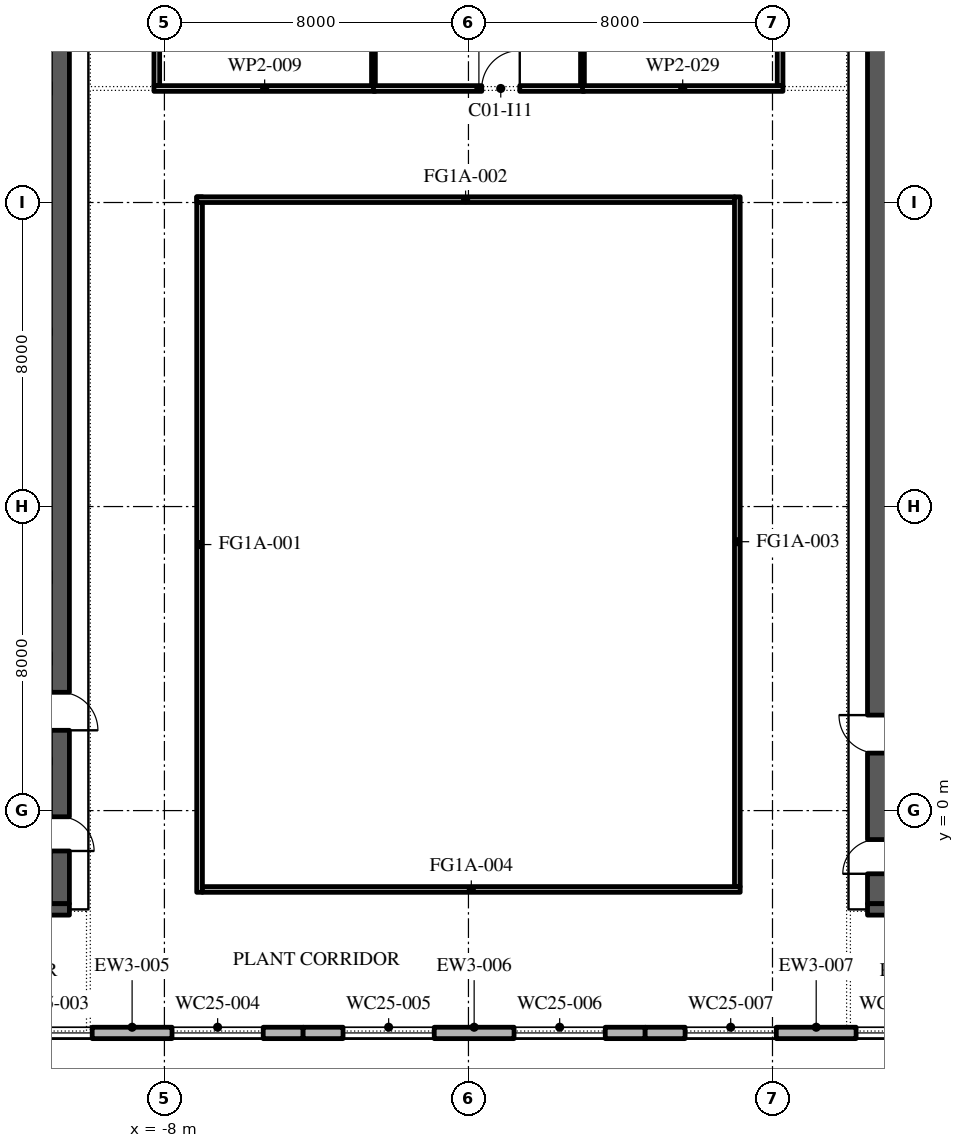
"""IFC4 building model, lengths in metres.
Left out: names, types, materials, properties, quantities, classifications, styles, units other than length and angle.
Written with IfcOpenShell. Run it as: python <this file> out.ifc"""

import sys

from ifc_helpers import new_model, si_unit, direction, frame, frame_2d, origin, place, context, subcontext, project, spatial, polyline, rectangle, outline, extrude, element, fill, save


model = new_model("IFC4")
c1 = context("Model", 3, precision=1e-05, world=origin(), true_north=direction((0.0, 1.0)))
c2 = subcontext(c1, "Body", "Model", "MODEL_VIEW")
j1 = project(units=[si_unit("LENGTHUNIT", "METRE"), si_unit("PLANEANGLEUNIT", "RADIAN")], contexts=[c1])
p1 = place(None, origin())
s1 = spatial("IfcSite", under=j1, at=p1, CompositionType="ELEMENT")
p2 = place(p1, origin())
s2 = spatial("IfcBuilding", under=s1, at=p2, CompositionType="ELEMENT")
p3 = place(p2, frame((0.0, 0.0, 369.0)))
s3 = spatial("IfcBuildingStorey", under=s2, at=p3, CompositionType="ELEMENT", Elevation=369.0)
p4 = place(p3, frame((-7.075, -2.15, 0.0), z_axis=(0.0, 0.0, 1.0), x_axis=(0.0, 1.0, 0.0)))
e1 = element("IfcWall", 1, at=p4, inside=s3, PredefinedType="STANDARD", context=c2, shape_type="SweptSolid", body=[
    extrude(rectangle(XDim=18.3, YDim=0.15, at=frame_2d((9.15, 0.0))), origin(), (0.0, 0.0, 1.0), 4.0),
])
p5 = place(p3, frame((-7.15, 16.075, 0.0), z_axis=(0.0, 0.0, 1.0), x_axis=(1.0, 0.0, 0.0)))
e2 = element("IfcWall", 2, at=p5, inside=s3, PredefinedType="STANDARD", context=c2, shape_type="SweptSolid", body=[
    extrude(rectangle(XDim=14.15, YDim=0.15, at=frame_2d((7.075, 0.0))), origin(), (0.0, 0.0, 1.0), 4.0),
])
p6 = place(p3, frame((7.075, 16.15, 0.0), z_axis=(0.0, 0.0, 1.0), x_axis=(0.0, -1.0, 0.0)))
e3 = element("IfcWall", 3, at=p6, inside=s3, PredefinedType="STANDARD", context=c2, shape_type="SweptSolid", body=[
    extrude(rectangle(XDim=18.15, YDim=0.15, at=frame_2d((9.075, 0.0))), origin(), (0.0, 0.0, 1.0), 4.0),
])
p7 = place(p3, frame((7.15, -2.075, 0.0), z_axis=(0.0, 0.0, 1.0), x_axis=(-1.0, 0.0, 0.0)))
e4 = element("IfcWall", 4, at=p7, inside=s3, PredefinedType="STANDARD", context=c2, shape_type="SweptSolid", body=[
    extrude(rectangle(XDim=14.15, YDim=0.15, at=frame_2d((7.075, 0.0))), origin(), (0.0, 0.0, 1.0), 4.0),
])
p8 = place(p3, frame((-13.35, -5.85, 0.0), z_axis=(0.0, 0.0, 1.0), x_axis=(1.0, 0.0, 0.0)))
e5 = element("IfcWall", 5, at=p8, inside=s3, PredefinedType="STANDARD", context=c2, shape_type="SweptSolid", body=[
    extrude(rectangle(XDim=9.0, YDim=0.3, at=frame_2d((4.5, 0.0))), origin(), (0.0, 0.0, 1.0), 4.0),
])
p9 = place(p8, frame((1.05, 0.0, 0.8)))
e6 = element("IfcOpeningElement", 6, at=p9, cuts=e5, PredefinedType="OPENING", context=c2, shape_type="SweptSolid", body=[
    extrude(outline(polyline([(0.0, 0.0), (2.4, 0.0), (2.4, 1.25), (2.377, 1.488), (2.31, 1.717), (2.2, 1.929), (2.051, 2.116), (1.87, 2.272), (1.663, 2.391), (1.437, 2.468), (1.2, 2.5), (0.963, 2.468), (0.737, 2.391), (0.53, 2.272), (0.349, 2.116), (0.2, 1.929), (0.09, 1.717), (0.023, 1.488), (0.0, 1.25), (0.0, 0.0)])), frame((0.0, 0.16, 0.0), z_axis=(0.0, -1.0, 0.0), x_axis=(1.0, 0.0, 0.0)), (0.0, 0.0, 1.0), 0.32),
])
p10 = place(p8, frame((5.55, 0.0, 0.8)))
e7 = element("IfcOpeningElement", 7, at=p10, cuts=e5, PredefinedType="OPENING", context=c2, shape_type="SweptSolid", body=[
    extrude(outline(polyline([(0.0, 0.0), (2.4, 0.0), (2.4, 1.25), (2.377, 1.488), (2.31, 1.717), (2.2, 1.929), (2.051, 2.116), (1.87, 2.272), (1.663, 2.391), (1.437, 2.468), (1.2, 2.5), (0.963, 2.468), (0.737, 2.391), (0.53, 2.272), (0.349, 2.116), (0.2, 1.929), (0.09, 1.717), (0.023, 1.488), (0.0, 1.25), (0.0, 0.0)])), frame((0.0, 0.16, 0.0), z_axis=(0.0, -1.0, 0.0), x_axis=(1.0, 0.0, 0.0)), (0.0, 0.0, 1.0), 0.32),
])
p11 = place(p3, frame((-4.35, -5.85, 0.0), z_axis=(0.0, 0.0, 1.0), x_axis=(1.0, 0.0, 0.0)))
e8 = element("IfcWall", 8, at=p11, inside=s3, PredefinedType="STANDARD", context=c2, shape_type="SweptSolid", body=[
    extrude(rectangle(XDim=9.0, YDim=0.3, at=frame_2d((4.5, 0.0))), origin(), (0.0, 0.0, 1.0), 4.0),
])
p12 = place(p11, frame((1.05, 0.0, 0.8)))
e9 = element("IfcOpeningElement", 9, at=p12, cuts=e8, PredefinedType="OPENING", context=c2, shape_type="SweptSolid", body=[
    extrude(outline(polyline([(0.0, 0.0), (2.4, 0.0), (2.4, 1.25), (2.377, 1.488), (2.31, 1.717), (2.2, 1.929), (2.051, 2.116), (1.87, 2.272), (1.663, 2.391), (1.437, 2.468), (1.2, 2.5), (0.963, 2.468), (0.737, 2.391), (0.53, 2.272), (0.349, 2.116), (0.2, 1.929), (0.09, 1.717), (0.023, 1.488), (0.0, 1.25), (0.0, 0.0)])), frame((0.0, 0.16, 0.0), z_axis=(0.0, -1.0, 0.0), x_axis=(1.0, 0.0, 0.0)), (0.0, 0.0, 1.0), 0.32),
])
p13 = place(p11, frame((5.55, 0.0, 0.8)))
e10 = element("IfcOpeningElement", 10, at=p13, cuts=e8, PredefinedType="OPENING", context=c2, shape_type="SweptSolid", body=[
    extrude(outline(polyline([(0.0, 0.0), (2.4, 0.0), (2.4, 1.25), (2.377, 1.488), (2.31, 1.717), (2.2, 1.929), (2.051, 2.116), (1.87, 2.272), (1.663, 2.391), (1.437, 2.468), (1.2, 2.5), (0.963, 2.468), (0.737, 2.391), (0.53, 2.272), (0.349, 2.116), (0.2, 1.929), (0.09, 1.717), (0.023, 1.488), (0.0, 1.25), (0.0, 0.0)])), frame((0.0, 0.16, 0.0), z_axis=(0.0, -1.0, 0.0), x_axis=(1.0, 0.0, 0.0)), (0.0, 0.0, 1.0), 0.32),
])
p14 = place(p3, frame((4.65, -5.85, 0.0), z_axis=(0.0, 0.0, 1.0), x_axis=(1.0, 0.0, 0.0)))
e11 = element("IfcWall", 11, at=p14, inside=s3, PredefinedType="STANDARD", context=c2, shape_type="SweptSolid", body=[
    extrude(rectangle(XDim=9.0, YDim=0.3, at=frame_2d((4.5, 0.0))), origin(), (0.0, 0.0, 1.0), 4.0),
])
p15 = place(p14, frame((1.05, 0.0, 0.8)))
e12 = element("IfcOpeningElement", 12, at=p15, cuts=e11, PredefinedType="OPENING", context=c2, shape_type="SweptSolid", body=[
    extrude(outline(polyline([(0.0, 0.0), (2.4, 0.0), (2.4, 1.25), (2.377, 1.488), (2.31, 1.717), (2.2, 1.929), (2.051, 2.116), (1.87, 2.272), (1.663, 2.391), (1.437, 2.468), (1.2, 2.5), (0.963, 2.468), (0.737, 2.391), (0.53, 2.272), (0.349, 2.116), (0.2, 1.929), (0.09, 1.717), (0.023, 1.488), (0.0, 1.25), (0.0, 0.0)])), frame((0.0, 0.16, 0.0), z_axis=(0.0, -1.0, 0.0), x_axis=(1.0, 0.0, 0.0)), (0.0, 0.0, 1.0), 0.32),
])
p16 = place(p14, frame((5.55, 0.0, 0.8)))
e13 = element("IfcOpeningElement", 13, at=p16, cuts=e11, PredefinedType="OPENING", context=c2, shape_type="SweptSolid", body=[
    extrude(outline(polyline([(0.0, 0.0), (2.4, 0.0), (2.4, 1.25), (2.377, 1.488), (2.31, 1.717), (2.2, 1.929), (2.051, 2.116), (1.87, 2.272), (1.663, 2.391), (1.437, 2.468), (1.2, 2.5), (0.963, 2.468), (0.737, 2.391), (0.53, 2.272), (0.349, 2.116), (0.2, 1.929), (0.09, 1.717), (0.023, 1.488), (0.0, 1.25), (0.0, 0.0)])), frame((0.0, 0.16, 0.0), z_axis=(0.0, -1.0, 0.0), x_axis=(1.0, 0.0, 0.0)), (0.0, 0.0, 1.0), 0.32),
])
p17 = place(p3, frame((-10.75, -2.45, 0.0), z_axis=(0.0, 0.0, 1.0), x_axis=(0.0, 1.0, 0.0)))
e14 = element("IfcWall", 14, at=p17, inside=s3, PredefinedType="SHEAR", context=c2, shape_type="SweptSolid", body=[
    extrude(rectangle(XDim=27.9, YDim=0.5, at=frame_2d((13.95, 0.0))), origin(), (0.0, 0.0, 1.0), 4.0),
])
p18 = place(p17, frame((23.65, 0.0, 0.0)))
e15 = element("IfcOpeningElement", 15, at=p18, cuts=e14, PredefinedType="OPENING", context=c2, shape_type="SweptSolid", body=[
    extrude(rectangle(XDim=2.4, YDim=2.1, at=frame_2d((1.2, 1.05))), frame((0.0, 0.26, 0.0), z_axis=(0.0, -1.0, 0.0), x_axis=(1.0, 0.0, 0.0)), (0.0, 0.0, 1.0), 0.52),
])
p19 = place(p17, frame((1.387, 0.0, 0.0)))
e16 = element("IfcOpeningElement", 16, at=p19, cuts=e14, PredefinedType="OPENING", context=c2, shape_type="SweptSolid", body=[
    extrude(rectangle(XDim=0.9, YDim=2.1, at=frame_2d((0.45, 1.05))), frame((0.0, 0.26, 0.0), z_axis=(0.0, -1.0, 0.0), x_axis=(1.0, 0.0, 0.0)), (0.0, 0.0, 1.0), 0.52),
])
p20 = place(p17, frame((4.562, 0.0, 0.0)))
e17 = element("IfcOpeningElement", 17, at=p20, cuts=e14, PredefinedType="OPENING", context=c2, shape_type="SweptSolid", body=[
    extrude(rectangle(XDim=1.0, YDim=2.1, at=frame_2d((0.5, 1.05))), frame((0.0, 0.26, 0.0), z_axis=(0.0, -1.0, 0.0), x_axis=(1.0, 0.0, 0.0)), (0.0, 0.0, 1.0), 0.52),
])
p21 = place(p3, frame((-21.5, -2.6, 0.0), z_axis=(0.0, 0.0, 1.0), x_axis=(1.0, 0.0, 0.0)))
e18 = element("IfcWall", 18, at=p21, inside=s3, PredefinedType="SHEAR", context=c2, shape_type="SweptSolid", body=[
    extrude(rectangle(XDim=11.0, YDim=0.3, at=frame_2d((5.5, 0.0))), origin(), (0.0, 0.0, 1.0), 4.0),
])
p22 = place(p3, frame((10.75, -2.45, 0.0), z_axis=(0.0, 0.0, 1.0), x_axis=(0.0, 1.0, 0.0)))
e19 = element("IfcWall", 19, at=p22, inside=s3, PredefinedType="SHEAR", context=c2, shape_type="SweptSolid", body=[
    extrude(rectangle(XDim=27.9, YDim=0.5, at=frame_2d((13.95, 0.0))), origin(), (0.0, 0.0, 1.0), 4.0),
])
p23 = place(p22, frame((23.65, 0.0, 0.0)))
e20 = element("IfcOpeningElement", 20, at=p23, cuts=e19, PredefinedType="OPENING", context=c2, shape_type="SweptSolid", body=[
    extrude(rectangle(XDim=2.4, YDim=2.1, at=frame_2d((1.2, 1.05))), frame((0.0, 0.26, 0.0), z_axis=(0.0, -1.0, 0.0), x_axis=(1.0, 0.0, 0.0)), (0.0, 0.0, 1.0), 0.52),
])
p24 = place(p22, frame((0.788, 0.0, 0.0)))
e21 = element("IfcOpeningElement", 21, at=p24, cuts=e19, PredefinedType="OPENING", context=c2, shape_type="SweptSolid", body=[
    extrude(rectangle(XDim=0.9, YDim=2.1, at=frame_2d((0.45, 1.05))), frame((0.0, 0.26, 0.0), z_axis=(0.0, -1.0, 0.0), x_axis=(1.0, 0.0, 0.0)), (0.0, 0.0, 1.0), 0.52),
])
p25 = place(p22, frame((3.962, 0.0, 0.0)))
e22 = element("IfcOpeningElement", 22, at=p25, cuts=e19, PredefinedType="OPENING", context=c2, shape_type="SweptSolid", body=[
    extrude(rectangle(XDim=1.0, YDim=2.1, at=frame_2d((0.5, 1.05))), frame((0.0, 0.26, 0.0), z_axis=(0.0, -1.0, 0.0), x_axis=(1.0, 0.0, 0.0)), (0.0, 0.0, 1.0), 0.52),
])
p26 = place(p3, frame((10.5, -2.6, 0.0), z_axis=(0.0, 0.0, 1.0), x_axis=(1.0, 0.0, 0.0)))
e23 = element("IfcWall", 23, at=p26, inside=s3, PredefinedType="SHEAR", context=c2, shape_type="SweptSolid", body=[
    extrude(rectangle(XDim=11.0, YDim=0.3, at=frame_2d((5.5, 0.0))), origin(), (0.0, 0.0, 1.0), 4.0),
])
p27 = place(p3, frame((-8.275, 19.0, 0.0), z_axis=(0.0, 0.0, 1.0), x_axis=(1.0, 0.0, 0.0)))
e24 = element("IfcWall", 24, at=p27, inside=s3, PredefinedType="PARTITIONING", context=c2, shape_type="SweptSolid", body=[
    extrude(rectangle(XDim=5.825, YDim=0.15, at=frame_2d((2.913, 0.0))), origin(), (0.0, 0.0, 1.0), 4.0),
])
p28 = place(p3, frame((-8.2, 27.555, 0.0), z_axis=(0.0, 0.0, 1.0), x_axis=(0.0, -1.0, 0.0)))
e25 = element("IfcWall", 25, at=p28, inside=s3, PredefinedType="PARTITIONING", context=c2, shape_type="SweptSolid", body=[
    extrude(rectangle(XDim=8.48, YDim=0.15, at=frame_2d((4.24, 0.0))), origin(), (0.0, 0.0, 1.0), 4.0),
])
p29 = place(p28, frame((4.655, 0.0, 0.0)))
e26 = element("IfcOpeningElement", 26, at=p29, cuts=e25, PredefinedType="OPENING", context=c2, shape_type="SweptSolid", body=[
    extrude(rectangle(XDim=1.0, YDim=2.1, at=frame_2d((0.5, 1.05))), frame((0.0, 0.085, 0.0), z_axis=(0.0, -1.0, 0.0), x_axis=(1.0, 0.0, 0.0)), (0.0, 0.0, 1.0), 0.17),
])
p30 = place(p3, frame((-2.5, 19.075, 0.0), z_axis=(0.0, 0.0, 1.0), x_axis=(0.0, 1.0, 0.0)))
e27 = element("IfcWall", 27, at=p30, inside=s3, PredefinedType="PARTITIONING", context=c2, shape_type="SweptSolid", body=[
    extrude(rectangle(XDim=6.67, YDim=0.1, at=frame_2d((3.335, 0.0))), origin(), (0.0, 0.0, 1.0), 4.0),
])
p31 = place(p3, frame((-2.5, 19.0, 0.0), z_axis=(0.0, 0.0, 1.0), x_axis=(1.0, 0.0, 0.0)))
e28 = element("IfcWall", 28, at=p31, inside=s3, PredefinedType="PARTITIONING", context=c2, shape_type="SweptSolid", body=[
    extrude(rectangle(XDim=5.55, YDim=0.15, at=frame_2d((2.775, 0.0))), origin(), (0.0, 0.0, 1.0), 4.0),
])
p32 = place(p31, frame((2.85, 0.0, 0.0)))
e29 = element("IfcOpeningElement", 29, at=p32, cuts=e28, PredefinedType="OPENING", context=c2, shape_type="SweptSolid", body=[
    extrude(rectangle(XDim=1.0, YDim=2.1, at=frame_2d((0.5, 1.05))), frame((0.0, 0.085, 0.0), z_axis=(0.0, -1.0, 0.0), x_axis=(1.0, 0.0, 0.0)), (0.0, 0.0, 1.0), 0.17),
])
p33 = place(p3, frame((3.0, 19.075, 0.0), z_axis=(0.0, 0.0, 1.0), x_axis=(0.0, 1.0, 0.0)))
e30 = element("IfcWall", 30, at=p33, inside=s3, PredefinedType="PARTITIONING", context=c2, shape_type="SweptSolid", body=[
    extrude(rectangle(XDim=8.48, YDim=0.1, at=frame_2d((4.24, 0.0))), origin(), (0.0, 0.0, 1.0), 4.0),
])
p34 = place(p3, frame((3.0, 19.0, 0.0), z_axis=(0.0, 0.0, 1.0), x_axis=(1.0, 0.0, 0.0)))
e31 = element("IfcWall", 31, at=p34, inside=s3, PredefinedType="PARTITIONING", context=c2, shape_type="SweptSolid", body=[
    extrude(rectangle(XDim=5.275, YDim=0.15, at=frame_2d((2.637, 0.0))), origin(), (0.0, 0.0, 1.0), 4.0),
])
p35 = place(p3, frame((8.2, 19.075, 0.0), z_axis=(0.0, 0.0, 1.0), x_axis=(0.0, 1.0, 0.0)))
e32 = element("IfcWall", 32, at=p35, inside=s3, PredefinedType="PARTITIONING", context=c2, shape_type="SweptSolid", body=[
    extrude(rectangle(XDim=8.48, YDim=0.15, at=frame_2d((4.24, 0.0))), origin(), (0.0, 0.0, 1.0), 4.0),
])
p36 = place(p35, frame((2.755, 0.0, 0.0)))
e33 = element("IfcOpeningElement", 33, at=p36, cuts=e32, PredefinedType="OPENING", context=c2, shape_type="SweptSolid", body=[
    extrude(rectangle(XDim=1.0, YDim=2.1, at=frame_2d((0.5, 1.05))), frame((0.0, 0.085, 0.0), z_axis=(0.0, -1.0, 0.0), x_axis=(1.0, 0.0, 0.0)), (0.0, 0.0, 1.0), 0.17),
])
p37 = place(p9, origin())
e34 = element("IfcWindow", 34, at=p37, inside=s3, PartitioningType="DOUBLE_PANEL_VERTICAL", PredefinedType="WINDOW", context=c2, shape_type="SweptSolid", body=[
    extrude(outline(polyline([(0.0, 0.0), (2.4, 0.0), (2.4, 1.25), (2.377, 1.488), (2.31, 1.717), (2.2, 1.929), (2.051, 2.116), (1.87, 2.272), (1.663, 2.391), (1.437, 2.468), (1.2, 2.5), (0.963, 2.468), (0.737, 2.391), (0.53, 2.272), (0.349, 2.116), (0.2, 1.929), (0.09, 1.717), (0.023, 1.488), (0.0, 1.25), (0.0, 0.0)])), frame((0.0, 0.03, 0.0), z_axis=(0.0, -1.0, 0.0), x_axis=(1.0, 0.0, 0.0)), (0.0, 0.0, 1.0), 0.06),
])
fill(e6, e34)
p38 = place(p10, origin())
e35 = element("IfcWindow", 35, at=p38, inside=s3, PartitioningType="DOUBLE_PANEL_VERTICAL", PredefinedType="WINDOW", context=c2, shape_type="SweptSolid", body=[
    extrude(outline(polyline([(0.0, 0.0), (2.4, 0.0), (2.4, 1.25), (2.377, 1.488), (2.31, 1.717), (2.2, 1.929), (2.051, 2.116), (1.87, 2.272), (1.663, 2.391), (1.437, 2.468), (1.2, 2.5), (0.963, 2.468), (0.737, 2.391), (0.53, 2.272), (0.349, 2.116), (0.2, 1.929), (0.09, 1.717), (0.023, 1.488), (0.0, 1.25), (0.0, 0.0)])), frame((0.0, 0.03, 0.0), z_axis=(0.0, -1.0, 0.0), x_axis=(1.0, 0.0, 0.0)), (0.0, 0.0, 1.0), 0.06),
])
fill(e7, e35)
p39 = place(p12, origin())
e36 = element("IfcWindow", 36, at=p39, inside=s3, PartitioningType="DOUBLE_PANEL_VERTICAL", PredefinedType="WINDOW", context=c2, shape_type="SweptSolid", body=[
    extrude(outline(polyline([(0.0, 0.0), (2.4, 0.0), (2.4, 1.25), (2.377, 1.488), (2.31, 1.717), (2.2, 1.929), (2.051, 2.116), (1.87, 2.272), (1.663, 2.391), (1.437, 2.468), (1.2, 2.5), (0.963, 2.468), (0.737, 2.391), (0.53, 2.272), (0.349, 2.116), (0.2, 1.929), (0.09, 1.717), (0.023, 1.488), (0.0, 1.25), (0.0, 0.0)])), frame((0.0, 0.03, 0.0), z_axis=(0.0, -1.0, 0.0), x_axis=(1.0, 0.0, 0.0)), (0.0, 0.0, 1.0), 0.06),
])
fill(e9, e36)
p40 = place(p13, origin())
e37 = element("IfcWindow", 37, at=p40, inside=s3, PartitioningType="DOUBLE_PANEL_VERTICAL", PredefinedType="WINDOW", context=c2, shape_type="SweptSolid", body=[
    extrude(outline(polyline([(0.0, 0.0), (2.4, 0.0), (2.4, 1.25), (2.377, 1.488), (2.31, 1.717), (2.2, 1.929), (2.051, 2.116), (1.87, 2.272), (1.663, 2.391), (1.437, 2.468), (1.2, 2.5), (0.963, 2.468), (0.737, 2.391), (0.53, 2.272), (0.349, 2.116), (0.2, 1.929), (0.09, 1.717), (0.023, 1.488), (0.0, 1.25), (0.0, 0.0)])), frame((0.0, 0.03, 0.0), z_axis=(0.0, -1.0, 0.0), x_axis=(1.0, 0.0, 0.0)), (0.0, 0.0, 1.0), 0.06),
])
fill(e10, e37)
p41 = place(p15, origin())
e38 = element("IfcWindow", 38, at=p41, inside=s3, PartitioningType="DOUBLE_PANEL_VERTICAL", PredefinedType="WINDOW", context=c2, shape_type="SweptSolid", body=[
    extrude(outline(polyline([(0.0, 0.0), (2.4, 0.0), (2.4, 1.25), (2.377, 1.488), (2.31, 1.717), (2.2, 1.929), (2.051, 2.116), (1.87, 2.272), (1.663, 2.391), (1.437, 2.468), (1.2, 2.5), (0.963, 2.468), (0.737, 2.391), (0.53, 2.272), (0.349, 2.116), (0.2, 1.929), (0.09, 1.717), (0.023, 1.488), (0.0, 1.25), (0.0, 0.0)])), frame((0.0, 0.03, 0.0), z_axis=(0.0, -1.0, 0.0), x_axis=(1.0, 0.0, 0.0)), (0.0, 0.0, 1.0), 0.06),
])
fill(e12, e38)
p42 = place(p16, origin())
e39 = element("IfcWindow", 39, at=p42, inside=s3, PartitioningType="DOUBLE_PANEL_VERTICAL", PredefinedType="WINDOW", context=c2, shape_type="SweptSolid", body=[
    extrude(outline(polyline([(0.0, 0.0), (2.4, 0.0), (2.4, 1.25), (2.377, 1.488), (2.31, 1.717), (2.2, 1.929), (2.051, 2.116), (1.87, 2.272), (1.663, 2.391), (1.437, 2.468), (1.2, 2.5), (0.963, 2.468), (0.737, 2.391), (0.53, 2.272), (0.349, 2.116), (0.2, 1.929), (0.09, 1.717), (0.023, 1.488), (0.0, 1.25), (0.0, 0.0)])), frame((0.0, 0.03, 0.0), z_axis=(0.0, -1.0, 0.0), x_axis=(1.0, 0.0, 0.0)), (0.0, 0.0, 1.0), 0.06),
])
fill(e13, e39)
p43 = place(p32, origin())
e40 = element("IfcDoor", 40, at=p43, inside=s3, OperationType="SINGLE_SWING_LEFT", PredefinedType="DOOR", context=c2, shape_type="SweptSolid", body=[
    extrude(rectangle(XDim=1.0, YDim=2.1, at=frame_2d((0.5, 1.05))), frame((0.0, 0.025, 0.0), z_axis=(0.0, -1.0, 0.0), x_axis=(1.0, 0.0, 0.0)), (0.0, 0.0, 1.0), 0.05),
])
fill(e29, e40)
save(model, sys.argv[1])
